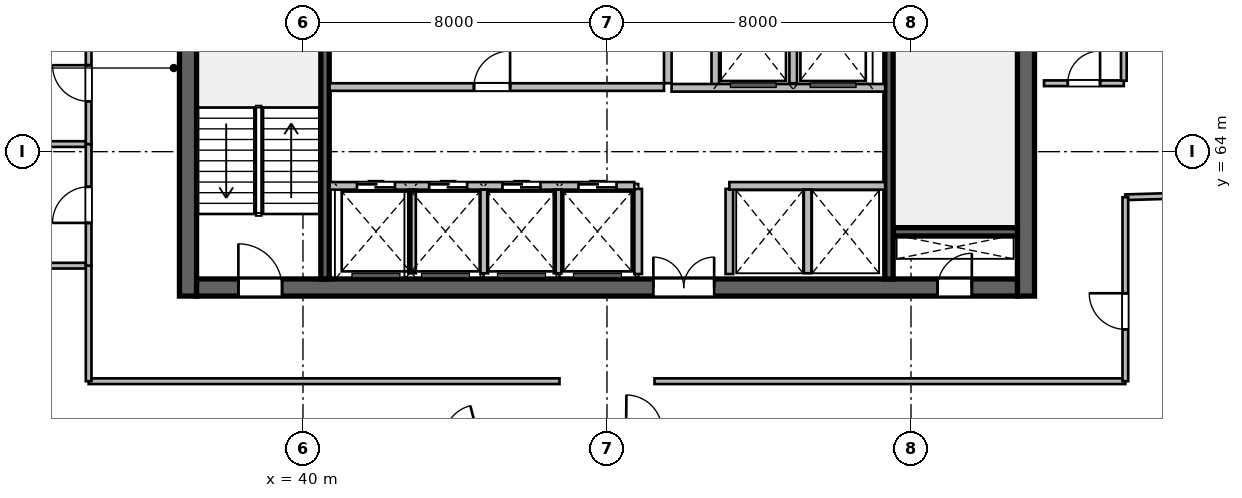
"""IFC4 building model, lengths in metres.
Left out: names, types, materials, properties, quantities, classifications, styles, units other than length and angle.
Written with IfcOpenShell. Run it as: python <this file> out.ifc"""

import sys

from ifc_helpers import new_model, si_unit, direction, frame, frame_2d, origin, place, context, subcontext, project, spatial, rectangle, extrude, source, transform, mapped, element, fill, save


model = new_model("IFC4")
c1 = context("Model", 3, precision=1e-05, world=origin(), true_north=direction((0.0, 1.0)))
c2 = subcontext(c1, "Body", "Model", "MODEL_VIEW")
j1 = project(units=[si_unit("LENGTHUNIT", "METRE"), si_unit("PLANEANGLEUNIT", "RADIAN")], contexts=[c1])
p1 = place(None, origin())
s1 = spatial("IfcSite", under=j1, at=p1, CompositionType="ELEMENT")
p2 = place(p1, origin())
s2 = spatial("IfcBuilding", under=s1, at=p2, CompositionType="ELEMENT")
p3 = place(p2, frame((0.0, 0.0, 243.0)))
s3 = spatial("IfcBuildingStorey", under=s2, at=p3, CompositionType="ELEMENT", Elevation=243.0)
m1 = source(origin(), c2, "Body", "SweptSolid", [
    extrude(rectangle(XDim=12.0, YDim=0.45, at=frame_2d((6.0, 0.0))), origin(), (0.0, 0.0, 1.0), 3.9),
])
for number, where, z_axis, x_axis in (
    (1, (36.975, 60.2, 0.0), (0.0, 0.0, 1.0), (0.0, 1.0, 0.0)),
    (2, (59.025, 60.2, 0.0), (0.0, 0.0, 1.0), (0.0, 1.0, 0.0)),
):
    element("IfcWall", number, at=place(p3, frame(where, z_axis=z_axis, x_axis=x_axis)), inside=s3, PredefinedType="SHEAR", context=c2, shape_type="MappedRepresentation", body=[
        mapped(m1, transform((0.0, 0.0, 0.0), scale=1.0)),
    ])
m2 = source(origin(), c2, "Body", "SweptSolid", [
    extrude(rectangle(XDim=21.6, YDim=0.45, at=frame_2d((10.8, 0.0))), origin(), (0.0, 0.0, 1.0), 3.9),
])
p4 = place(p3, frame((37.2, 60.425, 0.0), z_axis=(0.0, 0.0, 1.0), x_axis=(1.0, 0.0, 0.0)))
e3 = element("IfcWall", 3, at=p4, inside=s3, PredefinedType="SHEAR", context=c2, shape_type="MappedRepresentation", body=[
    mapped(m2, transform((0.0, 0.0, 0.0), scale=1.0)),
])
p5 = place(p4, frame((1.1, 0.0, 0.0)))
e4 = element("IfcOpeningElement", 4, at=p5, cuts=e3, PredefinedType="OPENING", context=c2, shape_type="SweptSolid", body=[
    extrude(rectangle(XDim=1.15, YDim=2.15, at=frame_2d((0.575, 1.075))), frame((0.0, 0.235, 0.0), z_axis=(0.0, -1.0, 0.0), x_axis=(1.0, 0.0, 0.0)), (0.0, 0.0, 1.0), 0.47),
])
p6 = place(p4, frame((19.5, 0.0, 0.0)))
e5 = element("IfcOpeningElement", 5, at=p6, cuts=e3, PredefinedType="OPENING", context=c2, shape_type="SweptSolid", body=[
    extrude(rectangle(XDim=0.9, YDim=2.1, at=frame_2d((0.45, 1.05))), frame((0.0, 0.235, 0.0), z_axis=(0.0, -1.0, 0.0), x_axis=(1.0, 0.0, 0.0)), (0.0, 0.0, 1.0), 0.47),
])
p7 = place(p4, frame((12.02, 0.0, 0.0)))
e6 = element("IfcOpeningElement", 6, at=p7, cuts=e3, PredefinedType="OPENING", context=c2, shape_type="SweptSolid", body=[
    extrude(rectangle(XDim=1.6, YDim=2.15, at=frame_2d((0.8, 1.075))), frame((0.0, 0.235, 0.0), z_axis=(0.0, -1.0, 0.0), x_axis=(1.0, 0.0, 0.0)), (0.0, 0.0, 1.0), 0.47),
])
m3 = source(origin(), c2, "Body", "SweptSolid", [
    extrude(rectangle(XDim=3.27, YDim=0.22, at=frame_2d((1.635, 0.0))), origin(), (0.0, 0.0, 1.0), 3.9),
])
p8 = place(p3, frame((55.53, 61.89, 0.0), z_axis=(0.0, 0.0, 1.0), x_axis=(1.0, 0.0, 0.0)))
e7 = element("IfcWall", 7, at=p8, inside=s3, PredefinedType="SHEAR", context=c2, shape_type="MappedRepresentation", body=[
    mapped(m3, transform((0.0, 0.0, 0.0), scale=1.0)),
])
m4 = source(origin(), c2, "Body", "SweptSolid", [
    extrude(rectangle(XDim=11.1, YDim=0.22, at=frame_2d((5.55, 0.0))), origin(), (0.0, 0.0, 1.0), 3.9),
])
p9 = place(p3, frame((40.58, 60.65, 0.0), z_axis=(0.0, 0.0, 1.0), x_axis=(0.0, 1.0, 0.0)))
e8 = element("IfcWall", 8, at=p9, inside=s3, PredefinedType="SHEAR", context=c2, shape_type="MappedRepresentation", body=[
    mapped(m4, transform((0.0, 0.0, 0.0), scale=1.0)),
])
p10 = place(p3, frame((55.42, 60.65, 0.0), z_axis=(0.0, 0.0, 1.0), x_axis=(0.0, 1.0, 0.0)))
e9 = element("IfcWall", 9, at=p10, inside=s3, PredefinedType="SHEAR", context=c2, shape_type="MappedRepresentation", body=[
    mapped(m4, transform((0.0, 0.0, 0.0), scale=1.0)),
])
p11 = place(p10, frame((9.595, 0.0, 0.0)))
e10 = element("IfcOpeningElement", 10, at=p11, cuts=e9, PredefinedType="OPENING", context=c2, shape_type="SweptSolid", body=[
    extrude(rectangle(XDim=1.15, YDim=2.15, at=frame_2d((0.575, 1.075))), frame((0.0, 0.12, 0.0), z_axis=(0.0, -1.0, 0.0), x_axis=(1.0, 0.0, 0.0)), (0.0, 0.0, 1.0), 0.24),
])
m5 = source(origin(), c2, "Body", "SweptSolid", [
    extrude(rectangle(XDim=2.24, YDim=0.2, at=frame_2d((1.12, 0.0))), origin(), (0.0, 0.0, 1.0), 3.65),
])
for number, where, z_axis, x_axis in (
    (11, (48.82, 60.78, 0.0), (0.0, 0.0, 1.0), (0.0, 1.0, 0.0)),
    (12, (51.22, 60.78, 0.0), (0.0, 0.0, 1.0), (0.0, 1.0, 0.0)),
):
    element("IfcWall", number, at=place(p3, frame(where, z_axis=z_axis, x_axis=x_axis)), inside=s3, PredefinedType="SOLIDWALL", context=c2, shape_type="MappedRepresentation", body=[
        mapped(m5, transform((0.0, 0.0, 0.0), scale=1.0)),
    ])
m6 = source(origin(), c2, "Body", "SweptSolid", [
    extrude(rectangle(XDim=5.8, YDim=0.2, at=frame_2d((2.9, 0.0))), origin(), (0.0, 0.0, 1.0), 3.65),
])
p12 = place(p3, frame((49.6, 65.8, 0.0), z_axis=(0.0, 0.0, 1.0), x_axis=(0.0, 1.0, 0.0)))
e13 = element("IfcWall", 13, at=p12, inside=s3, PredefinedType="SOLIDWALL", context=c2, shape_type="MappedRepresentation", body=[
    mapped(m6, transform((0.0, 0.0, 0.0), scale=1.0)),
])
m7 = source(origin(), c2, "Body", "SweptSolid", [
    extrude(rectangle(XDim=2.58, YDim=0.2, at=frame_2d((1.29, 0.0))), origin(), (0.0, 0.0, 1.0), 3.65),
])
p13 = place(p3, frame((50.85, 65.68, 0.0), z_axis=(0.0, 0.0, 1.0), x_axis=(0.0, 1.0, 0.0)))
e14 = element("IfcWall", 14, at=p13, inside=s3, PredefinedType="SOLIDWALL", context=c2, shape_type="MappedRepresentation", body=[
    mapped(m7, transform((0.0, 0.0, 0.0), scale=1.0)),
])
m8 = source(origin(), c2, "Body", "SweptSolid", [
    extrude(rectangle(XDim=2.4, YDim=0.2, at=frame_2d((1.2, 0.0))), origin(), (0.0, 0.0, 1.0), 3.65),
])
p14 = place(p3, frame((52.9, 65.8, 0.0), z_axis=(0.0, 0.0, 1.0), x_axis=(0.0, 1.0, 0.0)))
e15 = element("IfcWall", 15, at=p14, inside=s3, PredefinedType="SOLIDWALL", context=c2, shape_type="MappedRepresentation", body=[
    mapped(m8, transform((0.0, 0.0, 0.0), scale=1.0)),
])
m9 = source(origin(), c2, "Body", "SweptSolid", [
    extrude(rectangle(XDim=5.62, YDim=0.2, at=frame_2d((2.81, 0.0))), origin(), (0.0, 0.0, 1.0), 3.65),
])
p15 = place(p3, frame((49.7, 65.68, 0.0), z_axis=(0.0, 0.0, 1.0), x_axis=(1.0, 0.0, 0.0)))
e16 = element("IfcWall", 16, at=p15, inside=s3, PredefinedType="SOLIDWALL", context=c2, shape_type="MappedRepresentation", body=[
    mapped(m9, transform((0.0, 0.0, 0.0), scale=1.0)),
])
m10 = source(origin(), c2, "Body", "SweptSolid", [
    extrude(rectangle(XDim=8.02, YDim=0.2, at=frame_2d((4.01, 0.0))), origin(), (0.0, 0.0, 1.0), 3.65),
])
p16 = place(p3, frame((40.7, 63.1, 0.0), z_axis=(0.0, 0.0, 1.0), x_axis=(1.0, 0.0, 0.0)))
e17 = element("IfcWall", 17, at=p16, inside=s3, PredefinedType="SOLIDWALL", context=c2, shape_type="MappedRepresentation", body=[
    mapped(m10, transform((0.0, 0.0, 0.0), scale=1.0)),
])
p17 = place(p16, frame((0.72, 0.0, 0.0)))
e18 = element("IfcOpeningElement", 18, at=p17, cuts=e17, PredefinedType="OPENING", context=c2, shape_type="SweptSolid", body=[
    extrude(rectangle(XDim=1.0, YDim=2.15, at=frame_2d((0.5, 1.075))), frame((0.0, 0.11, 0.0), z_axis=(0.0, -1.0, 0.0), x_axis=(1.0, 0.0, 0.0)), (0.0, 0.0, 1.0), 0.22),
])
p18 = place(p16, frame((2.62, 0.0, 0.0)))
e19 = element("IfcOpeningElement", 19, at=p18, cuts=e17, PredefinedType="OPENING", context=c2, shape_type="SweptSolid", body=[
    extrude(rectangle(XDim=1.0, YDim=2.15, at=frame_2d((0.5, 1.075))), frame((0.0, 0.11, 0.0), z_axis=(0.0, -1.0, 0.0), x_axis=(1.0, 0.0, 0.0)), (0.0, 0.0, 1.0), 0.22),
])
p19 = place(p16, frame((4.55, 0.0, 0.0)))
e20 = element("IfcOpeningElement", 20, at=p19, cuts=e17, PredefinedType="OPENING", context=c2, shape_type="SweptSolid", body=[
    extrude(rectangle(XDim=1.0, YDim=2.15, at=frame_2d((0.5, 1.075))), frame((0.0, 0.11, 0.0), z_axis=(0.0, -1.0, 0.0), x_axis=(1.0, 0.0, 0.0)), (0.0, 0.0, 1.0), 0.22),
])
p20 = place(p16, frame((6.55, 0.0, 0.0)))
e21 = element("IfcOpeningElement", 21, at=p20, cuts=e17, PredefinedType="OPENING", context=c2, shape_type="SweptSolid", body=[
    extrude(rectangle(XDim=1.0, YDim=2.15, at=frame_2d((0.5, 1.075))), frame((0.0, 0.11, 0.0), z_axis=(0.0, -1.0, 0.0), x_axis=(1.0, 0.0, 0.0)), (0.0, 0.0, 1.0), 0.22),
])
m11 = source(origin(), c2, "Body", "SweptSolid", [
    extrude(rectangle(XDim=4.1, YDim=0.2, at=frame_2d((2.05, 0.0))), origin(), (0.0, 0.0, 1.0), 3.65),
])
p21 = place(p3, frame((51.22, 63.1, 0.0), z_axis=(0.0, 0.0, 1.0), x_axis=(1.0, 0.0, 0.0)))
e22 = element("IfcWall", 22, at=p21, inside=s3, PredefinedType="SOLIDWALL", context=c2, shape_type="MappedRepresentation", body=[
    mapped(m11, transform((0.0, 0.0, 0.0), scale=1.0)),
])
m12 = source(origin(), c2, "Body", "SweptSolid", [
    extrude(rectangle(XDim=2.2, YDim=0.2, at=frame_2d((1.1, 0.0))), origin(), (0.0, 0.0, 1.0), 3.65),
])
for number, where, z_axis, x_axis in (
    (23, (42.87, 60.8, 0.0), (0.0, 0.0, 1.0), (0.0, 1.0, 0.0)),
    (24, (44.77, 60.8, 0.0), (0.0, 0.0, 1.0), (0.0, 1.0, 0.0)),
    (25, (46.7, 60.8, 0.0), (0.0, 0.0, 1.0), (0.0, 1.0, 0.0)),
    (26, (53.28, 60.8, 0.0), (0.0, 0.0, 1.0), (0.0, 1.0, 0.0)),
):
    element("IfcWall", number, at=place(p3, frame(where, z_axis=z_axis, x_axis=x_axis)), inside=s3, PredefinedType="SOLIDWALL", context=c2, shape_type="MappedRepresentation", body=[
        mapped(m12, transform((0.0, 0.0, 0.0), scale=1.0)),
    ])
m13 = source(origin(), c2, "Body", "SweptSolid", [
    extrude(rectangle(XDim=8.8, YDim=0.2, at=frame_2d((4.4, 0.0))), origin(), (0.0, 0.0, 1.0), 3.65),
])
p22 = place(p3, frame((40.7, 65.7, 0.0), z_axis=(0.0, 0.0, 1.0), x_axis=(1.0, 0.0, 0.0)))
e27 = element("IfcWall", 27, at=p22, inside=s3, PredefinedType="SOLIDWALL", context=c2, shape_type="MappedRepresentation", body=[
    mapped(m13, transform((0.0, 0.0, 0.0), scale=1.0)),
])
p23 = place(p22, frame((3.8, 0.0, 0.0)))
e28 = element("IfcOpeningElement", 28, at=p23, cuts=e27, PredefinedType="OPENING", context=c2, shape_type="SweptSolid", body=[
    extrude(rectangle(XDim=0.95, YDim=2.15, at=frame_2d((0.475, 1.075))), frame((0.0, 0.11, 0.0), z_axis=(0.0, -1.0, 0.0), x_axis=(1.0, 0.0, 0.0)), (0.0, 0.0, 1.0), 0.22),
])
m14 = source(origin(), c2, "Body", "SweptSolid", [
    extrude(rectangle(XDim=2.1, YDim=0.15, at=frame_2d((1.05, 0.0))), origin(), (0.0, 0.0, 1.0), 3.65),
])
p24 = place(p3, frame((59.5, 65.8, 0.0), z_axis=(0.0, 0.0, 1.0), x_axis=(1.0, 0.0, 0.0)))
e29 = element("IfcWall", 29, at=p24, inside=s3, PredefinedType="PARTITIONING", context=c2, shape_type="MappedRepresentation", body=[
    mapped(m14, transform((0.0, 0.0, 0.0), scale=1.0)),
])
p25 = place(p24, frame((0.625, 0.0, 0.0)))
e30 = element("IfcOpeningElement", 30, at=p25, cuts=e29, PredefinedType="OPENING", context=c2, shape_type="SweptSolid", body=[
    extrude(rectangle(XDim=0.85, YDim=2.1, at=frame_2d((0.425, 1.05))), frame((0.0, 0.085, 0.0), z_axis=(0.0, -1.0, 0.0), x_axis=(1.0, 0.0, 0.0)), (0.0, 0.0, 1.0), 0.17),
])
m15 = source(origin(), c2, "Body", "SweptSolid", [
    extrude(rectangle(XDim=3.565, YDim=0.15, at=frame_2d((1.783, 0.0))), origin(), (0.0, 0.0, 1.0), 3.65),
])
p26 = place(p3, frame((61.6, 65.867, 0.0), z_axis=(0.0, 0.0, 1.0), x_axis=(0.0, 1.0, 0.0)))
e31 = element("IfcWall", 31, at=p26, inside=s3, PredefinedType="PARTITIONING", context=c2, shape_type="MappedRepresentation", body=[
    mapped(m15, transform((0.0, 0.0, 0.0), scale=1.0)),
])
p27 = place(p26, frame((0.88, 0.0, 0.0)))
e32 = element("IfcOpeningElement", 32, at=p27, cuts=e31, PredefinedType="OPENING", context=c2, shape_type="SweptSolid", body=[
    extrude(rectangle(XDim=0.95, YDim=2.1, at=frame_2d((0.475, 1.05))), frame((0.0, 0.085, 0.0), z_axis=(0.0, -1.0, 0.0), x_axis=(1.0, 0.0, 0.0)), (0.0, 0.0, 1.0), 0.17),
])
m16 = source(origin(), c2, "Body", "SweptSolid", [
    extrude(rectangle(XDim=12.39, YDim=0.15, at=frame_2d((6.195, 0.0))), origin(), (0.0, 0.0, 1.0), 3.65),
])
for number, where, z_axis, x_axis in (
    (33, (34.36, 57.96, 0.0), (0.0, 0.0, 1.0), (1.0, 0.0, 0.0)),
    (34, (49.25, 57.96, 0.0), (0.0, 0.0, 1.0), (1.0, 0.0, 0.0)),
):
    element("IfcWall", number, at=place(p3, frame(where, z_axis=z_axis, x_axis=x_axis)), inside=s3, PredefinedType="PARTITIONING", context=c2, shape_type="MappedRepresentation", body=[
        mapped(m16, transform((0.0, 0.0, 0.0), scale=1.0)),
    ])
m17 = source(origin(), c2, "Body", "SweptSolid", [
    extrude(rectangle(XDim=17.879, YDim=0.15, at=frame_2d((8.939, 0.0))), origin(), (0.0, 0.0, 1.0), 3.65),
])
p28 = place(p3, frame((16.481, 61.0, 0.0), z_axis=(0.0, 0.0, 1.0), x_axis=(1.0, 0.0, 0.0)))
e35 = element("IfcWall", 35, at=p28, inside=s3, PredefinedType="PARTITIONING", context=c2, shape_type="MappedRepresentation", body=[
    mapped(m17, transform((0.0, 0.0, 0.0), scale=1.0)),
])
m18 = source(origin(), c2, "Body", "SweptSolid", [
    extrude(rectangle(XDim=3.04, YDim=0.15, at=frame_2d((1.52, 0.0))), origin(), (0.0, 0.0, 1.0), 3.65),
])
p29 = place(p3, frame((34.36, 57.96, 0.0), z_axis=(0.0, 0.0, 1.0), x_axis=(0.0, 1.0, 0.0)))
e36 = element("IfcWall", 36, at=p29, inside=s3, PredefinedType="PARTITIONING", context=c2, shape_type="MappedRepresentation", body=[
    mapped(m18, transform((0.0, 0.0, 0.0), scale=1.0)),
])
m19 = source(origin(), c2, "Body", "SweptSolid", [
    extrude(rectangle(XDim=15.501, YDim=0.15, at=frame_2d((7.751, 0.0))), origin(), (0.0, 0.0, 1.0), 3.65),
])
p30 = place(p3, frame((18.859, 64.2, 0.0), z_axis=(0.0, 0.0, 1.0), x_axis=(1.0, 0.0, 0.0)))
e37 = element("IfcWall", 37, at=p30, inside=s3, PredefinedType="PARTITIONING", context=c2, shape_type="MappedRepresentation", body=[
    mapped(m19, transform((0.0, 0.0, 0.0), scale=1.0)),
])
m20 = source(origin(), c2, "Body", "SweptSolid", [
    extrude(rectangle(XDim=3.2, YDim=0.15, at=frame_2d((1.6, 0.0))), origin(), (0.0, 0.0, 1.0), 3.65),
])
p31 = place(p3, frame((34.36, 61.0, 0.0), z_axis=(0.0, 0.0, 1.0), x_axis=(0.0, 1.0, 0.0)))
e38 = element("IfcWall", 38, at=p31, inside=s3, PredefinedType="PARTITIONING", context=c2, shape_type="MappedRepresentation", body=[
    mapped(m20, transform((0.0, 0.0, 0.0), scale=1.0)),
])
p32 = place(p31, frame((1.125, 0.0, 0.0)))
e39 = element("IfcOpeningElement", 39, at=p32, cuts=e38, PredefinedType="OPENING", context=c2, shape_type="SweptSolid", body=[
    extrude(rectangle(XDim=0.95, YDim=2.1, at=frame_2d((0.475, 1.05))), frame((0.0, 0.085, 0.0), z_axis=(0.0, -1.0, 0.0), x_axis=(1.0, 0.0, 0.0)), (0.0, 0.0, 1.0), 0.17),
])
p33 = place(p3, frame((34.36, 64.2, 0.0), z_axis=(0.0, 0.0, 1.0), x_axis=(0.0, 1.0, 0.0)))
e40 = element("IfcWall", 40, at=p33, inside=s3, PredefinedType="PARTITIONING", context=c2, shape_type="MappedRepresentation", body=[
    mapped(m20, transform((0.0, 0.0, 0.0), scale=1.0)),
])
p34 = place(p33, frame((1.125, 0.0, 0.0)))
e41 = element("IfcOpeningElement", 41, at=p34, cuts=e40, PredefinedType="OPENING", context=c2, shape_type="SweptSolid", body=[
    extrude(rectangle(XDim=0.95, YDim=2.1, at=frame_2d((0.475, 1.05))), frame((0.0, 0.085, 0.0), z_axis=(0.0, -1.0, 0.0), x_axis=(1.0, 0.0, 0.0)), (0.0, 0.0, 1.0), 0.17),
])
m21 = source(origin(), c2, "Body", "SweptSolid", [
    extrude(rectangle(XDim=13.315, YDim=0.15, at=frame_2d((6.657, 0.0))), origin(), (0.0, 0.0, 1.0), 3.65),
])
p35 = place(p3, frame((61.64, 62.8, 0.0), z_axis=(0.0, 0.0, 1.0), x_axis=(0.999574400598, 0.029172207124, 0.0)))
e42 = element("IfcWall", 42, at=p35, inside=s3, PredefinedType="PARTITIONING", context=c2, shape_type="MappedRepresentation", body=[
    mapped(m21, transform((0.0, 0.0, 0.0), scale=1.0)),
])
m22 = source(origin(), c2, "Body", "SweptSolid", [
    extrude(rectangle(XDim=4.84, YDim=0.15, at=frame_2d((2.42, 0.0))), origin(), (0.0, 0.0, 1.0), 3.65),
])
p36 = place(p3, frame((61.64, 57.96, 0.0), z_axis=(0.0, 0.0, 1.0), x_axis=(0.0, 1.0, 0.0)))
e43 = element("IfcWall", 43, at=p36, inside=s3, PredefinedType="PARTITIONING", context=c2, shape_type="MappedRepresentation", body=[
    mapped(m22, transform((0.0, 0.0, 0.0), scale=1.0)),
])
p37 = place(p36, frame((1.364, 0.0, 0.0)))
e44 = element("IfcOpeningElement", 44, at=p37, cuts=e43, PredefinedType="OPENING", context=c2, shape_type="SweptSolid", body=[
    extrude(rectangle(XDim=0.95, YDim=2.1, at=frame_2d((0.475, 1.05))), frame((0.0, 0.085, 0.0), z_axis=(0.0, -1.0, 0.0), x_axis=(1.0, 0.0, 0.0)), (0.0, 0.0, 1.0), 0.17),
])
m23 = source(origin(), c2, "Body", "SweptSolid", [
    extrude(rectangle(XDim=1.15, YDim=2.15, at=frame_2d((0.575, 1.075))), frame((0.0, 0.025, 0.0), z_axis=(0.0, -1.0, 0.0), x_axis=(1.0, 0.0, 0.0)), (0.0, 0.0, 1.0), 0.05),
])
p38 = place(p5, origin())
e45 = element("IfcDoor", 45, at=p38, inside=s3, OperationType="SINGLE_SWING_LEFT", PredefinedType="DOOR", context=c2, shape_type="MappedRepresentation", body=[
    mapped(m23, transform((0.0, 0.0, 0.0), scale=1.0)),
])
fill(e4, e45)
m24 = source(origin(), c2, "Body", "SweptSolid", [
    extrude(rectangle(XDim=0.9, YDim=2.1, at=frame_2d((0.45, 1.05))), frame((0.0, 0.025, 0.0), z_axis=(0.0, -1.0, 0.0), x_axis=(1.0, 0.0, 0.0)), (0.0, 0.0, 1.0), 0.05),
])
p39 = place(p6, origin())
e46 = element("IfcDoor", 46, at=p39, inside=s3, OperationType="SINGLE_SWING_RIGHT", PredefinedType="DOOR", context=c2, shape_type="MappedRepresentation", body=[
    mapped(m24, transform((0.0, 0.0, 0.0), scale=1.0)),
])
fill(e5, e46)
m25 = source(origin(), c2, "Body", "SweptSolid", [
    extrude(rectangle(XDim=1.6, YDim=2.15, at=frame_2d((0.8, 1.075))), frame((0.0, 0.025, 0.0), z_axis=(0.0, -1.0, 0.0), x_axis=(1.0, 0.0, 0.0)), (0.0, 0.0, 1.0), 0.05),
])
p40 = place(p7, origin())
e47 = element("IfcDoor", 47, at=p40, inside=s3, OperationType="DOUBLE_DOOR_SINGLE_SWING", PredefinedType="DOOR", context=c2, shape_type="MappedRepresentation", body=[
    mapped(m25, transform((0.0, 0.0, 0.0), scale=1.0)),
])
fill(e6, e47)
m26 = source(origin(), c2, "Body", "SweptSolid", [
    extrude(rectangle(XDim=1.0, YDim=2.15, at=frame_2d((0.5, 1.075))), frame((0.0, 0.025, 0.0), z_axis=(0.0, -1.0, 0.0), x_axis=(1.0, 0.0, 0.0)), (0.0, 0.0, 1.0), 0.05),
])
p41 = place(p17, origin())
e48 = element("IfcDoor", 48, at=p41, inside=s3, OperationType="DOUBLE_DOOR_SLIDING", PredefinedType="DOOR", context=c2, shape_type="MappedRepresentation", body=[
    mapped(m26, transform((0.0, 0.0, 0.0), scale=1.0)),
])
fill(e18, e48)
p42 = place(p18, origin())
e49 = element("IfcDoor", 49, at=p42, inside=s3, OperationType="DOUBLE_DOOR_SLIDING", PredefinedType="DOOR", context=c2, shape_type="MappedRepresentation", body=[
    mapped(m26, transform((0.0, 0.0, 0.0), scale=1.0)),
])
fill(e19, e49)
p43 = place(p19, origin())
e50 = element("IfcDoor", 50, at=p43, inside=s3, OperationType="DOUBLE_DOOR_SLIDING", PredefinedType="DOOR", context=c2, shape_type="MappedRepresentation", body=[
    mapped(m26, transform((0.0, 0.0, 0.0), scale=1.0)),
])
fill(e20, e50)
p44 = place(p20, origin())
e51 = element("IfcDoor", 51, at=p44, inside=s3, OperationType="DOUBLE_DOOR_SLIDING", PredefinedType="DOOR", context=c2, shape_type="MappedRepresentation", body=[
    mapped(m26, transform((0.0, 0.0, 0.0), scale=1.0)),
])
fill(e21, e51)
m27 = source(origin(), c2, "Body", "SweptSolid", [
    extrude(rectangle(XDim=0.95, YDim=2.15, at=frame_2d((0.475, 1.075))), frame((0.0, 0.025, 0.0), z_axis=(0.0, -1.0, 0.0), x_axis=(1.0, 0.0, 0.0)), (0.0, 0.0, 1.0), 0.05),
])
p45 = place(p23, origin())
e52 = element("IfcDoor", 52, at=p45, inside=s3, OperationType="SINGLE_SWING_RIGHT", PredefinedType="DOOR", context=c2, shape_type="MappedRepresentation", body=[
    mapped(m27, transform((0.0, 0.0, 0.0), scale=1.0)),
])
fill(e28, e52)
m28 = source(origin(), c2, "Body", "SweptSolid", [
    extrude(rectangle(XDim=0.85, YDim=2.1, at=frame_2d((0.425, 1.05))), frame((0.0, 0.025, 0.0), z_axis=(0.0, -1.0, 0.0), x_axis=(1.0, 0.0, 0.0)), (0.0, 0.0, 1.0), 0.05),
])
p46 = place(p25, origin())
e53 = element("IfcDoor", 53, at=p46, inside=s3, OperationType="SINGLE_SWING_RIGHT", PredefinedType="DOOR", context=c2, shape_type="MappedRepresentation", body=[
    mapped(m28, transform((0.0, 0.0, 0.0), scale=1.0)),
])
fill(e30, e53)
m29 = source(origin(), c2, "Body", "SweptSolid", [
    extrude(rectangle(XDim=0.95, YDim=2.1, at=frame_2d((0.475, 1.05))), frame((0.0, 0.025, 0.0), z_axis=(0.0, -1.0, 0.0), x_axis=(1.0, 0.0, 0.0)), (0.0, 0.0, 1.0), 0.05),
])
p47 = place(p32, origin())
e54 = element("IfcDoor", 54, at=p47, inside=s3, OperationType="SINGLE_SWING_LEFT", PredefinedType="DOOR", context=c2, shape_type="MappedRepresentation", body=[
    mapped(m29, transform((0.0, 0.0, 0.0), scale=1.0)),
])
fill(e39, e54)
p48 = place(p34, origin())
e55 = element("IfcDoor", 55, at=p48, inside=s3, OperationType="SINGLE_SWING_RIGHT", PredefinedType="DOOR", context=c2, shape_type="MappedRepresentation", body=[
    mapped(m29, transform((0.0, 0.0, 0.0), scale=1.0)),
])
fill(e41, e55)
p49 = place(p37, origin())
e56 = element("IfcDoor", 56, at=p49, inside=s3, OperationType="SINGLE_SWING_RIGHT", PredefinedType="DOOR", context=c2, shape_type="MappedRepresentation", body=[
    mapped(m29, transform((0.0, 0.0, 0.0), scale=1.0)),
])
fill(e44, e56)
save(model, sys.argv[1])
